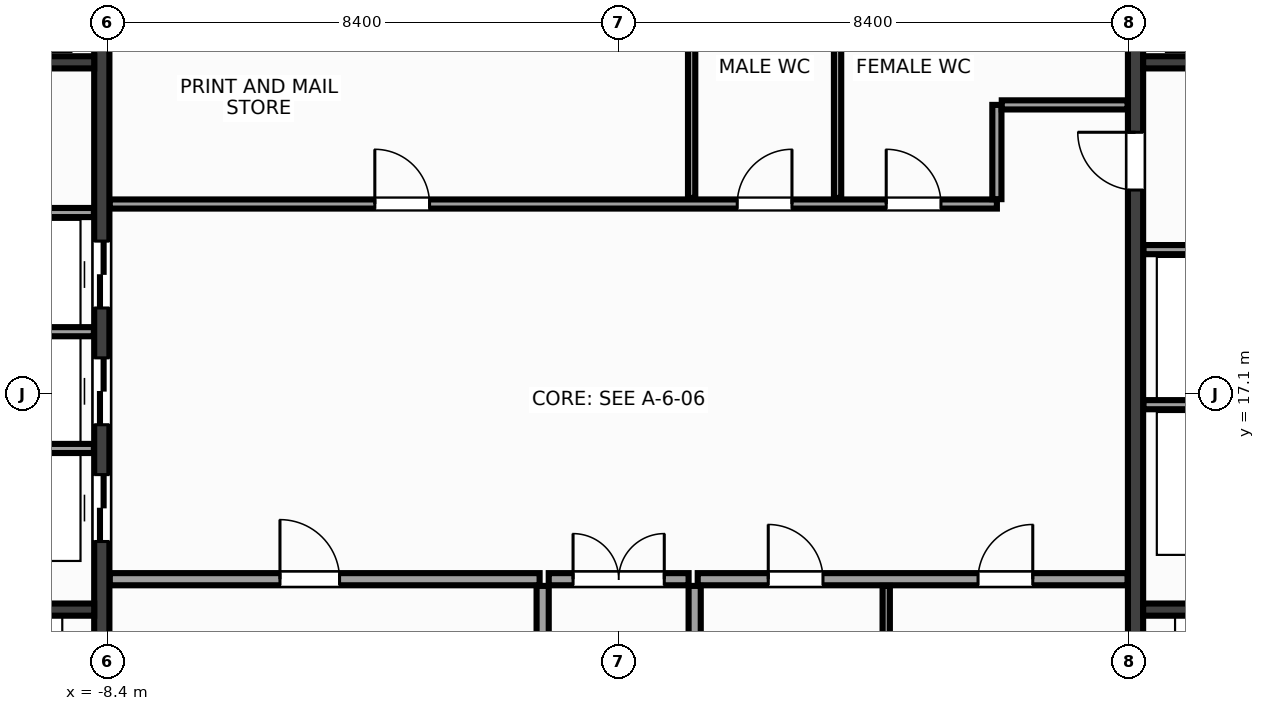
"""IFC4 building model, lengths in metres.
Left out: names, types, materials, properties, quantities, classifications, styles, units other than length and angle.
Written with IfcOpenShell. Run it as: python <this file> out.ifc"""

import sys

from ifc_helpers import new_model, si_unit, direction, frame, frame_2d, origin, place, context, subcontext, project, spatial, rectangle, extrude, source, transform, mapped, element, fill, save


model = new_model("IFC4")
c1 = context("Model", 3, precision=1e-05, world=origin(), true_north=direction((0.0, 1.0)))
c2 = subcontext(c1, "Body", "Model", "MODEL_VIEW")
j1 = project(units=[si_unit("LENGTHUNIT", "METRE"), si_unit("PLANEANGLEUNIT", "RADIAN")], contexts=[c1])
p1 = place(None, origin())
s1 = spatial("IfcSite", under=j1, at=p1, CompositionType="ELEMENT")
p2 = place(p1, origin())
s2 = spatial("IfcBuilding", under=s1, at=p2, CompositionType="ELEMENT")
p3 = place(p2, frame((0.0, 0.0, 250.4)))
s3 = spatial("IfcBuildingStorey", under=s2, at=p3, CompositionType="ELEMENT", Elevation=250.4)
m1 = source(origin(), c2, "Body", "SweptSolid", [
    extrude(rectangle(XDim=13.1, YDim=0.25, at=frame_2d((6.55, 0.0))), origin(), (0.0, 0.0, 1.0), 3.6),
])
p4 = place(p3, frame((-8.5, 10.45, 0.0), z_axis=(0.0, 0.0, 1.0), x_axis=(0.0, 1.0, 0.0)))
e1 = element("IfcWall", 1, at=p4, inside=s3, PredefinedType="SHEAR", context=c2, shape_type="MappedRepresentation", body=[
    mapped(m1, transform((0.0, 0.0, 0.0), x_axis=(1.0, 0.0, 0.0), y_axis=(0.0, 1.0, 0.0), z_axis=(0.0, 0.0, 1.0), scale=1.0)),
])
p5 = place(p4, frame((4.22, 0.0, 0.0)))
e2 = element("IfcOpeningElement", 2, at=p5, cuts=e1, PredefinedType="OPENING", context=c2, shape_type="SweptSolid", body=[
    extrude(rectangle(XDim=1.1, YDim=2.15, at=frame_2d((0.55, 1.075))), frame((0.0, 0.137, 0.0), z_axis=(0.0, -1.0, 0.0), x_axis=(1.0, 0.0, 0.0)), (0.0, 0.0, 1.0), 0.274),
])
p6 = place(p4, frame((6.14, 0.0, 0.0)))
e3 = element("IfcOpeningElement", 3, at=p6, cuts=e1, PredefinedType="OPENING", context=c2, shape_type="SweptSolid", body=[
    extrude(rectangle(XDim=1.1, YDim=2.15, at=frame_2d((0.55, 1.075))), frame((0.0, 0.137, 0.0), z_axis=(0.0, -1.0, 0.0), x_axis=(1.0, 0.0, 0.0)), (0.0, 0.0, 1.0), 0.274),
])
p7 = place(p4, frame((8.06, 0.0, 0.0)))
e4 = element("IfcOpeningElement", 4, at=p7, cuts=e1, PredefinedType="OPENING", context=c2, shape_type="SweptSolid", body=[
    extrude(rectangle(XDim=1.1, YDim=2.15, at=frame_2d((0.55, 1.075))), frame((0.0, 0.137, 0.0), z_axis=(0.0, -1.0, 0.0), x_axis=(1.0, 0.0, 0.0)), (0.0, 0.0, 1.0), 0.274),
])
p8 = place(p3, frame((8.5, 10.45, 0.0), z_axis=(0.0, 0.0, 1.0), x_axis=(0.0, 1.0, 0.0)))
e5 = element("IfcWall", 5, at=p8, inside=s3, PredefinedType="SHEAR", context=c2, shape_type="MappedRepresentation", body=[
    mapped(m1, transform((0.0, 0.0, 0.0), x_axis=(1.0, 0.0, 0.0), y_axis=(0.0, 1.0, 0.0), z_axis=(0.0, 0.0, 1.0), scale=1.0)),
])
p9 = place(p8, frame((10.0, 0.0, 0.0)))
e6 = element("IfcOpeningElement", 6, at=p9, cuts=e5, PredefinedType="OPENING", context=c2, shape_type="SweptSolid", body=[
    extrude(rectangle(XDim=0.95, YDim=2.15, at=frame_2d((0.475, 1.075))), frame((0.0, 0.137, 0.0), z_axis=(0.0, -1.0, 0.0), x_axis=(1.0, 0.0, 0.0)), (0.0, 0.0, 1.0), 0.274),
])
m2 = source(origin(), c2, "Body", "SweptSolid", [
    extrude(rectangle(XDim=2.825, YDim=0.2, at=frame_2d((1.413, 0.0))), origin(), (0.0, 0.0, 1.0), 3.6),
])
for number, where, z_axis, x_axis in (
    (7, (-11.45, 13.55, 0.0), (0.0, 0.0, 1.0), (1.0, 0.0, 0.0)),
    (8, (8.625, 13.55, 0.0), (0.0, 0.0, 1.0), (1.0, 0.0, 0.0)),
):
    element("IfcWall", number, at=place(p3, frame(where, z_axis=z_axis, x_axis=x_axis)), inside=s3, PredefinedType="SHEAR", context=c2, shape_type="MappedRepresentation", body=[
        mapped(m2, transform((0.0, 0.0, 0.0), x_axis=(1.0, 0.0, 0.0), y_axis=(0.0, 1.0, 0.0), z_axis=(0.0, 0.0, 1.0), scale=1.0)),
    ])
m3 = source(origin(), c2, "Body", "SweptSolid", [
    extrude(rectangle(XDim=3.02, YDim=0.2, at=frame_2d((1.51, 0.0))), origin(), (0.0, 0.0, 1.0), 3.6),
])
for number, where, z_axis, x_axis in (
    (9, (-11.645, 22.55, 0.0), (0.0, 0.0, 1.0), (1.0, 0.0, 0.0)),
    (10, (8.625, 22.55, 0.0), (0.0, 0.0, 1.0), (1.0, 0.0, 0.0)),
):
    element("IfcWall", number, at=place(p3, frame(where, z_axis=z_axis, x_axis=x_axis)), inside=s3, PredefinedType="SHEAR", context=c2, shape_type="MappedRepresentation", body=[
        mapped(m3, transform((0.0, 0.0, 0.0), x_axis=(1.0, 0.0, 0.0), y_axis=(0.0, 1.0, 0.0), z_axis=(0.0, 0.0, 1.0), scale=1.0)),
    ])
m4 = source(origin(), c2, "Body", "SweptSolid", [
    extrude(rectangle(XDim=3.01, YDim=0.15, at=frame_2d((1.505, 0.0))), origin(), (0.0, 0.0, 1.0), 3.37),
])
for number, where, z_axis, x_axis in (
    (11, (-11.64, 16.2, 0.0), (0.0, 0.0, 1.0), (1.0, 0.0, 0.0)),
    (12, (-11.64, 18.12, 0.0), (0.0, 0.0, 1.0), (1.0, 0.0, 0.0)),
    (13, (-11.64, 20.08, 0.0), (0.0, 0.0, 1.0), (1.0, 0.0, 0.0)),
    (14, (8.63, 16.92, 0.0), (0.0, 0.0, 1.0), (1.0, 0.0, 0.0)),
    (15, (8.63, 19.47, 0.0), (0.0, 0.0, 1.0), (1.0, 0.0, 0.0)),
):
    element("IfcWall", number, at=place(p3, frame(where, z_axis=z_axis, x_axis=x_axis)), inside=s3, PredefinedType="PARTITIONING", context=c2, shape_type="MappedRepresentation", body=[
        mapped(m4, transform((0.0, 0.0, 0.0), x_axis=(1.0, 0.0, 0.0), y_axis=(0.0, 1.0, 0.0), z_axis=(0.0, 0.0, 1.0), scale=1.0)),
    ])
m5 = source(origin(), c2, "Body", "SweptSolid", [
    extrude(rectangle(XDim=7.07, YDim=0.2, at=frame_2d((3.535, 0.0))), origin(), (0.0, 0.0, 1.0), 3.37),
])
p10 = place(p3, frame((-8.37, 14.05, 0.0), z_axis=(0.0, 0.0, 1.0), x_axis=(1.0, 0.0, 0.0)))
e16 = element("IfcWall", 16, at=p10, inside=s3, PredefinedType="PARTITIONING", context=c2, shape_type="MappedRepresentation", body=[
    mapped(m5, transform((0.0, 0.0, 0.0), x_axis=(1.0, 0.0, 0.0), y_axis=(0.0, 1.0, 0.0), z_axis=(0.0, 0.0, 1.0), scale=1.0)),
])
p11 = place(p10, frame((2.8, 0.0, 0.0)))
e17 = element("IfcOpeningElement", 17, at=p11, cuts=e16, PredefinedType="OPENING", context=c2, shape_type="SweptSolid", body=[
    extrude(rectangle(XDim=0.98, YDim=2.15, at=frame_2d((0.49, 1.075))), frame((0.0, 0.112, 0.0), z_axis=(0.0, -1.0, 0.0), x_axis=(1.0, 0.0, 0.0)), (0.0, 0.0, 1.0), 0.224),
])
p12 = place(p3, frame((1.3, 14.05, 0.0), z_axis=(0.0, 0.0, 1.0), x_axis=(1.0, 0.0, 0.0)))
e18 = element("IfcWall", 18, at=p12, inside=s3, PredefinedType="PARTITIONING", context=c2, shape_type="MappedRepresentation", body=[
    mapped(m5, transform((0.0, 0.0, 0.0), x_axis=(1.0, 0.0, 0.0), y_axis=(0.0, 1.0, 0.0), z_axis=(0.0, 0.0, 1.0), scale=1.0)),
])
p13 = place(p12, frame((1.16, 0.0, 0.0)))
e19 = element("IfcOpeningElement", 19, at=p13, cuts=e18, PredefinedType="OPENING", context=c2, shape_type="SweptSolid", body=[
    extrude(rectangle(XDim=0.9, YDim=2.15, at=frame_2d((0.45, 1.075))), frame((0.0, 0.112, 0.0), z_axis=(0.0, -1.0, 0.0), x_axis=(1.0, 0.0, 0.0)), (0.0, 0.0, 1.0), 0.224),
])
p14 = place(p12, frame((4.61, 0.0, 0.0)))
e20 = element("IfcOpeningElement", 20, at=p14, cuts=e18, PredefinedType="OPENING", context=c2, shape_type="SweptSolid", body=[
    extrude(rectangle(XDim=0.9, YDim=2.15, at=frame_2d((0.45, 1.075))), frame((0.0, 0.112, 0.0), z_axis=(0.0, -1.0, 0.0), x_axis=(1.0, 0.0, 0.0)), (0.0, 0.0, 1.0), 0.224),
])
m6 = source(origin(), c2, "Body", "SweptSolid", [
    extrude(rectangle(XDim=3.49, YDim=0.2, at=frame_2d((1.745, 0.0))), origin(), (0.0, 0.0, 1.0), 3.37),
])
for number, where, z_axis, x_axis in (
    (21, (-1.25, 10.45, 0.0), (0.0, 0.0, 1.0), (0.0, 1.0, 0.0)),
    (22, (1.25, 10.45, 0.0), (0.0, 0.0, 1.0), (0.0, 1.0, 0.0)),
):
    element("IfcWall", number, at=place(p3, frame(where, z_axis=z_axis, x_axis=x_axis)), inside=s3, PredefinedType="PARTITIONING", context=c2, shape_type="MappedRepresentation", body=[
        mapped(m6, transform((0.0, 0.0, 0.0), x_axis=(1.0, 0.0, 0.0), y_axis=(0.0, 1.0, 0.0), z_axis=(0.0, 0.0, 1.0), scale=1.0)),
    ])
m7 = source(origin(), c2, "Body", "SweptSolid", [
    extrude(rectangle(XDim=2.3, YDim=0.2, at=frame_2d((1.15, 0.0))), origin(), (0.0, 0.0, 1.0), 3.37),
])
p15 = place(p3, frame((-1.15, 14.05, 0.0), z_axis=(0.0, 0.0, 1.0), x_axis=(1.0, 0.0, 0.0)))
e23 = element("IfcWall", 23, at=p15, inside=s3, PredefinedType="PARTITIONING", context=c2, shape_type="MappedRepresentation", body=[
    mapped(m7, transform((0.0, 0.0, 0.0), x_axis=(1.0, 0.0, 0.0), y_axis=(0.0, 1.0, 0.0), z_axis=(0.0, 0.0, 1.0), scale=1.0)),
])
p16 = place(p15, frame((0.4, 0.0, 0.0)))
e24 = element("IfcOpeningElement", 24, at=p16, cuts=e23, PredefinedType="OPENING", context=c2, shape_type="SweptSolid", body=[
    extrude(rectangle(XDim=1.5, YDim=2.2, at=frame_2d((0.75, 1.1))), frame((0.0, 0.112, 0.0), z_axis=(0.0, -1.0, 0.0), x_axis=(1.0, 0.0, 0.0)), (0.0, 0.0, 1.0), 0.224),
])
m8 = source(origin(), c2, "Body", "SweptSolid", [
    extrude(rectangle(XDim=14.59, YDim=0.15, at=frame_2d((7.295, 0.0))), origin(), (0.0, 0.0, 1.0), 3.37),
])
p17 = place(p3, frame((-8.37, 20.22, 0.0), z_axis=(0.0, 0.0, 1.0), x_axis=(1.0, 0.0, 0.0)))
e25 = element("IfcWall", 25, at=p17, inside=s3, PredefinedType="PARTITIONING", context=c2, shape_type="MappedRepresentation", body=[
    mapped(m8, transform((0.0, 0.0, 0.0), x_axis=(1.0, 0.0, 0.0), y_axis=(0.0, 1.0, 0.0), z_axis=(0.0, 0.0, 1.0), scale=1.0)),
])
p18 = place(p17, frame((4.36, 0.0, 0.0)))
e26 = element("IfcOpeningElement", 26, at=p18, cuts=e25, PredefinedType="OPENING", context=c2, shape_type="SweptSolid", body=[
    extrude(rectangle(XDim=0.9, YDim=2.15, at=frame_2d((0.45, 1.075))), frame((0.0, 0.087, 0.0), z_axis=(0.0, -1.0, 0.0), x_axis=(1.0, 0.0, 0.0)), (0.0, 0.0, 1.0), 0.174),
])
p19 = place(p17, frame((10.32, 0.0, 0.0)))
e27 = element("IfcOpeningElement", 27, at=p19, cuts=e25, PredefinedType="OPENING", context=c2, shape_type="SweptSolid", body=[
    extrude(rectangle(XDim=0.9, YDim=2.15, at=frame_2d((0.45, 1.075))), frame((0.0, 0.087, 0.0), z_axis=(0.0, -1.0, 0.0), x_axis=(1.0, 0.0, 0.0)), (0.0, 0.0, 1.0), 0.174),
])
p20 = place(p17, frame((12.77, 0.0, 0.0)))
e28 = element("IfcOpeningElement", 28, at=p20, cuts=e25, PredefinedType="OPENING", context=c2, shape_type="SweptSolid", body=[
    extrude(rectangle(XDim=0.9, YDim=2.15, at=frame_2d((0.45, 1.075))), frame((0.0, 0.087, 0.0), z_axis=(0.0, -1.0, 0.0), x_axis=(1.0, 0.0, 0.0)), (0.0, 0.0, 1.0), 0.174),
])
m9 = source(origin(), c2, "Body", "SweptSolid", [
    extrude(rectangle(XDim=1.55, YDim=0.15, at=frame_2d((0.775, 0.0))), origin(), (0.0, 0.0, 1.0), 3.37),
])
p21 = place(p3, frame((6.22, 20.3, 0.0), z_axis=(0.0, 0.0, 1.0), x_axis=(0.0, 1.0, 0.0)))
e29 = element("IfcWall", 29, at=p21, inside=s3, PredefinedType="PARTITIONING", context=c2, shape_type="MappedRepresentation", body=[
    mapped(m9, transform((0.0, 0.0, 0.0), x_axis=(1.0, 0.0, 0.0), y_axis=(0.0, 1.0, 0.0), z_axis=(0.0, 0.0, 1.0), scale=1.0)),
])
m10 = source(origin(), c2, "Body", "SweptSolid", [
    extrude(rectangle(XDim=2.07, YDim=0.15, at=frame_2d((1.035, 0.0))), origin(), (0.0, 0.0, 1.0), 3.37),
])
p22 = place(p3, frame((6.3, 21.85, 0.0), z_axis=(0.0, 0.0, 1.0), x_axis=(1.0, 0.0, 0.0)))
e30 = element("IfcWall", 30, at=p22, inside=s3, PredefinedType="PARTITIONING", context=c2, shape_type="MappedRepresentation", body=[
    mapped(m10, transform((0.0, 0.0, 0.0), x_axis=(1.0, 0.0, 0.0), y_axis=(0.0, 1.0, 0.0), z_axis=(0.0, 0.0, 1.0), scale=1.0)),
])
m11 = source(origin(), c2, "Body", "SweptSolid", [
    extrude(rectangle(XDim=3.49, YDim=0.12, at=frame_2d((1.745, 0.0))), origin(), (0.0, 0.0, 1.0), 3.37),
])
p23 = place(p3, frame((4.4, 10.45, 0.0), z_axis=(0.0, 0.0, 1.0), x_axis=(0.0, 1.0, 0.0)))
e31 = element("IfcWall", 31, at=p23, inside=s3, PredefinedType="PARTITIONING", context=c2, shape_type="MappedRepresentation", body=[
    mapped(m11, transform((0.0, 0.0, 0.0), x_axis=(1.0, 0.0, 0.0), y_axis=(0.0, 1.0, 0.0), z_axis=(0.0, 0.0, 1.0), scale=1.0)),
])
m12 = source(origin(), c2, "Body", "SweptSolid", [
    extrude(rectangle(XDim=3.19, YDim=0.12, at=frame_2d((1.595, 0.0))), origin(), (0.0, 0.0, 1.0), 3.37),
])
for number, where, z_axis, x_axis in (
    (32, (1.2, 20.32, 0.0), (0.0, 0.0, 1.0), (0.0, 1.0, 0.0)),
    (33, (3.6, 20.32, 0.0), (0.0, 0.0, 1.0), (0.0, 1.0, 0.0)),
):
    element("IfcWall", number, at=place(p3, frame(where, z_axis=z_axis, x_axis=x_axis)), inside=s3, PredefinedType="PARTITIONING", context=c2, shape_type="MappedRepresentation", body=[
        mapped(m12, transform((0.0, 0.0, 0.0), x_axis=(1.0, 0.0, 0.0), y_axis=(0.0, 1.0, 0.0), z_axis=(0.0, 0.0, 1.0), scale=1.0)),
    ])
m13 = source(origin(), c2, "Body", "SweptSolid", [
    extrude(rectangle(XDim=1.1, YDim=2.15, at=frame_2d((0.55, 1.075))), frame((0.0, 0.025, 0.0), z_axis=(0.0, -1.0, 0.0), x_axis=(1.0, 0.0, 0.0)), (0.0, 0.0, 1.0), 0.05),
])
p24 = place(p5, origin())
e34 = element("IfcDoor", 34, at=p24, inside=s3, OperationType="DOUBLE_DOOR_SLIDING", PredefinedType="DOOR", context=c2, shape_type="MappedRepresentation", body=[
    mapped(m13, transform((0.0, 0.0, 0.0), x_axis=(1.0, 0.0, 0.0), y_axis=(0.0, 1.0, 0.0), z_axis=(0.0, 0.0, 1.0), scale=1.0)),
])
fill(e2, e34)
p25 = place(p6, origin())
e35 = element("IfcDoor", 35, at=p25, inside=s3, OperationType="DOUBLE_DOOR_SLIDING", PredefinedType="DOOR", context=c2, shape_type="MappedRepresentation", body=[
    mapped(m13, transform((0.0, 0.0, 0.0), x_axis=(1.0, 0.0, 0.0), y_axis=(0.0, 1.0, 0.0), z_axis=(0.0, 0.0, 1.0), scale=1.0)),
])
fill(e3, e35)
p26 = place(p7, origin())
e36 = element("IfcDoor", 36, at=p26, inside=s3, OperationType="DOUBLE_DOOR_SLIDING", PredefinedType="DOOR", context=c2, shape_type="MappedRepresentation", body=[
    mapped(m13, transform((0.0, 0.0, 0.0), x_axis=(1.0, 0.0, 0.0), y_axis=(0.0, 1.0, 0.0), z_axis=(0.0, 0.0, 1.0), scale=1.0)),
])
fill(e4, e36)
m14 = source(origin(), c2, "Body", "SweptSolid", [
    extrude(rectangle(XDim=0.95, YDim=2.15, at=frame_2d((0.475, 1.075))), frame((0.0, 0.025, 0.0), z_axis=(0.0, -1.0, 0.0), x_axis=(1.0, 0.0, 0.0)), (0.0, 0.0, 1.0), 0.05),
])
p27 = place(p9, origin())
e37 = element("IfcDoor", 37, at=p27, inside=s3, OperationType="SINGLE_SWING_RIGHT", PredefinedType="DOOR", context=c2, shape_type="MappedRepresentation", body=[
    mapped(m14, transform((0.0, 0.0, 0.0), x_axis=(1.0, 0.0, 0.0), y_axis=(0.0, 1.0, 0.0), z_axis=(0.0, 0.0, 1.0), scale=1.0)),
])
fill(e6, e37)
m15 = source(origin(), c2, "Body", "SweptSolid", [
    extrude(rectangle(XDim=0.98, YDim=2.15, at=frame_2d((0.49, 1.075))), frame((0.0, 0.025, 0.0), z_axis=(0.0, -1.0, 0.0), x_axis=(1.0, 0.0, 0.0)), (0.0, 0.0, 1.0), 0.05),
])
p28 = place(p11, origin())
e38 = element("IfcDoor", 38, at=p28, inside=s3, OperationType="SINGLE_SWING_LEFT", PredefinedType="DOOR", context=c2, shape_type="MappedRepresentation", body=[
    mapped(m15, transform((0.0, 0.0, 0.0), x_axis=(1.0, 0.0, 0.0), y_axis=(0.0, 1.0, 0.0), z_axis=(0.0, 0.0, 1.0), scale=1.0)),
])
fill(e17, e38)
m16 = source(origin(), c2, "Body", "SweptSolid", [
    extrude(rectangle(XDim=0.9, YDim=2.15, at=frame_2d((0.45, 1.075))), frame((0.0, 0.025, 0.0), z_axis=(0.0, -1.0, 0.0), x_axis=(1.0, 0.0, 0.0)), (0.0, 0.0, 1.0), 0.05),
])
p29 = place(p13, origin())
e39 = element("IfcDoor", 39, at=p29, inside=s3, OperationType="SINGLE_SWING_LEFT", PredefinedType="DOOR", context=c2, shape_type="MappedRepresentation", body=[
    mapped(m16, transform((0.0, 0.0, 0.0), x_axis=(1.0, 0.0, 0.0), y_axis=(0.0, 1.0, 0.0), z_axis=(0.0, 0.0, 1.0), scale=1.0)),
])
fill(e19, e39)
p30 = place(p14, origin())
e40 = element("IfcDoor", 40, at=p30, inside=s3, OperationType="SINGLE_SWING_RIGHT", PredefinedType="DOOR", context=c2, shape_type="MappedRepresentation", body=[
    mapped(m16, transform((0.0, 0.0, 0.0), x_axis=(1.0, 0.0, 0.0), y_axis=(0.0, 1.0, 0.0), z_axis=(0.0, 0.0, 1.0), scale=1.0)),
])
fill(e20, e40)
m17 = source(origin(), c2, "Body", "SweptSolid", [
    extrude(rectangle(XDim=1.5, YDim=2.2, at=frame_2d((0.75, 1.1))), frame((0.0, 0.025, 0.0), z_axis=(0.0, -1.0, 0.0), x_axis=(1.0, 0.0, 0.0)), (0.0, 0.0, 1.0), 0.05),
])
p31 = place(p16, origin())
e41 = element("IfcDoor", 41, at=p31, inside=s3, OperationType="DOUBLE_DOOR_SINGLE_SWING", PredefinedType="DOOR", context=c2, shape_type="MappedRepresentation", body=[
    mapped(m17, transform((0.0, 0.0, 0.0), x_axis=(1.0, 0.0, 0.0), y_axis=(0.0, 1.0, 0.0), z_axis=(0.0, 0.0, 1.0), scale=1.0)),
])
fill(e24, e41)
p32 = place(p18, origin())
e42 = element("IfcDoor", 42, at=p32, inside=s3, OperationType="SINGLE_SWING_LEFT", PredefinedType="DOOR", context=c2, shape_type="MappedRepresentation", body=[
    mapped(m16, transform((0.0, 0.0, 0.0), x_axis=(1.0, 0.0, 0.0), y_axis=(0.0, 1.0, 0.0), z_axis=(0.0, 0.0, 1.0), scale=1.0)),
])
fill(e26, e42)
p33 = place(p19, origin())
e43 = element("IfcDoor", 43, at=p33, inside=s3, OperationType="SINGLE_SWING_RIGHT", PredefinedType="DOOR", context=c2, shape_type="MappedRepresentation", body=[
    mapped(m16, transform((0.0, 0.0, 0.0), x_axis=(1.0, 0.0, 0.0), y_axis=(0.0, 1.0, 0.0), z_axis=(0.0, 0.0, 1.0), scale=1.0)),
])
fill(e27, e43)
p34 = place(p20, origin())
e44 = element("IfcDoor", 44, at=p34, inside=s3, OperationType="SINGLE_SWING_LEFT", PredefinedType="DOOR", context=c2, shape_type="MappedRepresentation", body=[
    mapped(m16, transform((0.0, 0.0, 0.0), x_axis=(1.0, 0.0, 0.0), y_axis=(0.0, 1.0, 0.0), z_axis=(0.0, 0.0, 1.0), scale=1.0)),
])
fill(e28, e44)
save(model, sys.argv[1])
